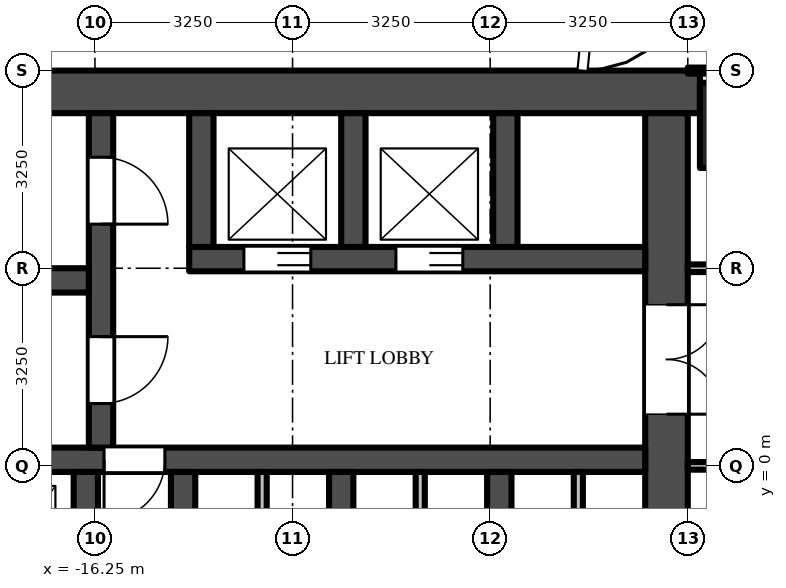
"""IFC4 building model, lengths in metres.
Left out: names, types, materials, properties, quantities, classifications, styles, units other than length and angle.
Written with IfcOpenShell. Run it as: python <this file> out.ifc"""

import sys

from ifc_helpers import new_model, si_unit, direction, frame, frame_2d, origin, origin_2d, place, context, subcontext, project, spatial, rectangle, extrude, source, transform, mapped, element, fill, save


model = new_model("IFC4")
c1 = context("Model", 3, precision=1e-05, world=origin(), true_north=direction((0.0, 1.0)))
c2 = subcontext(c1, "Body", "Model", "MODEL_VIEW")
j1 = project(units=[si_unit("LENGTHUNIT", "METRE"), si_unit("PLANEANGLEUNIT", "RADIAN")], contexts=[c1])
p1 = place(None, origin())
s1 = spatial("IfcSite", under=j1, at=p1, CompositionType="ELEMENT")
p2 = place(p1, origin())
s2 = spatial("IfcBuilding", under=s1, at=p2, CompositionType="ELEMENT")
p3 = place(p2, frame((0.0, 0.0, 74.5)))
s3 = spatial("IfcBuildingStorey", under=s2, at=p3, CompositionType="ELEMENT", Elevation=74.5)
m1 = source(origin(), c2, "Body", "SweptSolid", [
    extrude(rectangle(XDim=1.4, YDim=1.4, at=origin_2d()), origin(), (0.0, 0.0, 1.0), 4.5),
])
p4 = place(p3, frame((-5.6, 5.6, 0.0), z_axis=(0.0, 0.0, 1.0), x_axis=(1.0, 0.0, 0.0)))
e1 = element("IfcColumn", 1, at=p4, inside=s3, PredefinedType="COLUMN", context=c2, shape_type="MappedRepresentation", body=[
    mapped(m1, transform((0.0, 0.0, 0.0))),
])
m2 = source(origin(), c2, "Body", "SweptSolid", [
    extrude(rectangle(XDim=16.45, YDim=0.7, at=frame_2d((8.225, 0.0))), origin(), (0.0, 0.0, 1.0), 4.25),
])
p5 = place(p3, frame((-6.3, 6.15, 0.0), z_axis=(0.0, 0.0, 1.0), x_axis=(-1.0, 0.0, 0.0)))
e2 = element("IfcWall", 2, at=p5, inside=s3, PredefinedType="SHEAR", context=c2, shape_type="MappedRepresentation", body=[
    mapped(m2, transform((0.0, 0.0, 0.0))),
])
m3 = source(origin(), c2, "Body", "SweptSolid", [
    extrude(rectangle(XDim=9.05, YDim=0.7, at=frame_2d((4.525, 0.0))), origin(), (0.0, 0.0, 1.0), 4.25),
])
p6 = place(p3, frame((-6.85, 5.8, 0.0), z_axis=(0.0, 0.0, 1.0), x_axis=(0.0, -1.0, 0.0)))
e3 = element("IfcWall", 3, at=p6, inside=s3, PredefinedType="SHEAR", context=c2, shape_type="MappedRepresentation", body=[
    mapped(m3, transform((0.0, 0.0, 0.0))),
])
m4 = source(origin(), c2, "Body", "SweptSolid", [
    extrude(rectangle(XDim=1.8, YDim=2.1, at=frame_2d((0.9, 1.05))), frame((0.0, 0.36, 0.0), z_axis=(0.0, -1.0, 0.0), x_axis=(1.0, 0.0, 0.0)), (0.0, 0.0, 1.0), 0.72),
])
p7 = place(p6, frame((3.15, 0.0, 0.0)))
e4 = element("IfcOpeningElement", 4, at=p7, cuts=e3, PredefinedType="OPENING", context=c2, shape_type="MappedRepresentation", body=[
    mapped(m4, transform((0.0, 0.0, 0.0))),
])
m5 = source(origin(), c2, "Body", "SweptSolid", [
    extrude(rectangle(XDim=7.5, YDim=0.4, at=frame_2d((3.75, 0.0))), origin(), (0.0, 0.0, 1.0), 4.25),
])
p8 = place(p3, frame((-7.2, 3.4, 0.0), z_axis=(0.0, 0.0, 1.0), x_axis=(-1.0, 0.0, 0.0)))
e5 = element("IfcWall", 5, at=p8, inside=s3, PredefinedType="SHEAR", context=c2, shape_type="MappedRepresentation", body=[
    mapped(m5, transform((0.0, 0.0, 0.0))),
])
m6 = source(origin(), c2, "Body", "SweptSolid", [
    extrude(rectangle(XDim=1.1, YDim=2.1, at=frame_2d((0.55, 1.05))), frame((0.0, 0.21, 0.0), z_axis=(0.0, -1.0, 0.0), x_axis=(1.0, 0.0, 0.0)), (0.0, 0.0, 1.0), 0.42),
])
p9 = place(p8, frame((3.0, 0.0, 0.0)))
e6 = element("IfcOpeningElement", 6, at=p9, cuts=e5, PredefinedType="OPENING", context=c2, shape_type="MappedRepresentation", body=[
    mapped(m6, transform((0.0, 0.0, 0.0))),
])
p10 = place(p8, frame((5.5, 0.0, 0.0)))
e7 = element("IfcOpeningElement", 7, at=p10, cuts=e5, PredefinedType="OPENING", context=c2, shape_type="MappedRepresentation", body=[
    mapped(m6, transform((0.0, 0.0, 0.0))),
])
m7 = source(origin(), c2, "Body", "SweptSolid", [
    extrude(rectangle(XDim=14.85, YDim=0.4, at=frame_2d((7.425, 0.0))), origin(), (0.0, 0.0, 1.0), 4.25),
])
p11 = place(p3, frame((-7.2, 0.1, 0.0), z_axis=(0.0, 0.0, 1.0), x_axis=(-1.0, 0.0, 0.0)))
e8 = element("IfcWall", 8, at=p11, inside=s3, PredefinedType="SHEAR", context=c2, shape_type="MappedRepresentation", body=[
    mapped(m7, transform((0.0, 0.0, 0.0))),
])
m8 = source(origin(), c2, "Body", "SweptSolid", [
    extrude(rectangle(XDim=1.0, YDim=2.1, at=frame_2d((0.5, 1.05))), frame((0.0, 0.21, 0.0), z_axis=(0.0, -1.0, 0.0), x_axis=(1.0, 0.0, 0.0)), (0.0, 0.0, 1.0), 0.42),
])
p12 = place(p11, frame((7.9, 0.0, 0.0)))
e9 = element("IfcOpeningElement", 9, at=p12, cuts=e8, PredefinedType="OPENING", context=c2, shape_type="MappedRepresentation", body=[
    mapped(m8, transform((0.0, 0.0, 0.0))),
])
m9 = source(origin(), c2, "Body", "SweptSolid", [
    extrude(rectangle(XDim=5.5, YDim=0.4, at=frame_2d((2.75, 0.0))), origin(), (0.0, 0.0, 1.0), 4.25),
])
p13 = place(p3, frame((-16.15, 5.8, 0.0), z_axis=(0.0, 0.0, 1.0), x_axis=(0.0, -1.0, 0.0)))
e10 = element("IfcWall", 10, at=p13, inside=s3, PredefinedType="SHEAR", context=c2, shape_type="MappedRepresentation", body=[
    mapped(m9, transform((0.0, 0.0, 0.0))),
])
p14 = place(p13, frame((0.725, 0.0, 0.0)))
e11 = element("IfcOpeningElement", 11, at=p14, cuts=e10, PredefinedType="OPENING", context=c2, shape_type="MappedRepresentation", body=[
    mapped(m6, transform((0.0, 0.0, 0.0))),
])
p15 = place(p13, frame((3.675, 0.0, 0.0)))
e12 = element("IfcOpeningElement", 12, at=p15, cuts=e10, PredefinedType="OPENING", context=c2, shape_type="MappedRepresentation", body=[
    mapped(m6, transform((0.0, 0.0, 0.0))),
])
m10 = source(origin(), c2, "Body", "SweptSolid", [
    extrude(rectangle(XDim=5.7, YDim=0.4, at=frame_2d((2.85, 0.0))), origin(), (0.0, 0.0, 1.0), 4.25),
])
p16 = place(p3, frame((-16.35, 3.05, 0.0), z_axis=(0.0, 0.0, 1.0), x_axis=(-1.0, 0.0, 0.0)))
e13 = element("IfcWall", 13, at=p16, inside=s3, PredefinedType="SHEAR", context=c2, shape_type="MappedRepresentation", body=[
    mapped(m10, transform((0.0, 0.0, 0.0))),
])
m11 = source(origin(), c2, "Body", "SweptSolid", [
    extrude(rectangle(XDim=2.2, YDim=0.4, at=frame_2d((1.1, 0.0))), origin(), (0.0, 0.0, 1.0), 4.25),
])
for number, where, z_axis, x_axis in (
    (14, (-9.5, 5.8, 0.0), (0.0, 0.0, 1.0), (0.0, -1.0, 0.0)),
    (15, (-12.0, 5.8, 0.0), (0.0, 0.0, 1.0), (0.0, -1.0, 0.0)),
    (16, (-14.5, 5.8, 0.0), (0.0, 0.0, 1.0), (0.0, -1.0, 0.0)),
):
    element("IfcWall", number, at=place(p3, frame(where, z_axis=z_axis, x_axis=x_axis)), inside=s3, PredefinedType="SHEAR", context=c2, shape_type="MappedRepresentation", body=[
        mapped(m11, transform((0.0, 0.0, 0.0))),
    ])
m12 = source(origin(), c2, "Body", "SweptSolid", [
    extrude(rectangle(XDim=2.45, YDim=0.4, at=frame_2d((1.225, 0.0))), origin(), (0.0, 0.0, 1.0), 4.25),
])
for number, where, z_axis, x_axis in (
    (17, (-9.6, -0.1, 0.0), (0.0, 0.0, 1.0), (0.0, -1.0, 0.0)),
    (18, (-12.2, -0.1, 0.0), (0.0, 0.0, 1.0), (0.0, -1.0, 0.0)),
    (19, (-14.8, -0.1, 0.0), (0.0, 0.0, 1.0), (0.0, -1.0, 0.0)),
    (20, (-16.4, -0.1, 0.0), (0.0, 0.0, 1.0), (0.0, -1.0, 0.0)),
):
    element("IfcWall", number, at=place(p3, frame(where, z_axis=z_axis, x_axis=x_axis)), inside=s3, PredefinedType="SHEAR", context=c2, shape_type="MappedRepresentation", body=[
        mapped(m12, transform((0.0, 0.0, 0.0))),
    ])
m13 = source(origin(), c2, "Body", "SweptSolid", [
    extrude(rectangle(XDim=2.45, YDim=0.15, at=frame_2d((1.225, 0.0))), origin(), (0.0, 0.0, 1.0), 4.25),
])
for number, where, z_axis, x_axis in (
    (21, (-8.3, -0.1, 0.0), (0.0, 0.0, 1.0), (0.0, -1.0, 0.0)),
    (22, (-10.9, -0.1, 0.0), (0.0, 0.0, 1.0), (0.0, -1.0, 0.0)),
    (23, (-13.5, -0.1, 0.0), (0.0, 0.0, 1.0), (0.0, -1.0, 0.0)),
):
    element("IfcWall", number, at=place(p3, frame(where, z_axis=z_axis, x_axis=x_axis)), inside=s3, PredefinedType="PARTITIONING", context=c2, shape_type="MappedRepresentation", body=[
        mapped(m13, transform((0.0, 0.0, 0.0))),
    ])
m14 = source(origin(), c2, "Body", "SweptSolid", [
    extrude(rectangle(XDim=5.363, YDim=0.125, at=frame_2d((2.681, 0.0))), origin(), (0.0, 0.0, 1.0), 3.468),
])
p17 = place(p3, frame((-1.137, 0.0, 0.0), z_axis=(0.0, 0.0, 1.0), x_axis=(-1.0, 0.0, 0.0)))
e24 = element("IfcWall", 24, at=p17, inside=s3, PredefinedType="PARTITIONING", context=c2, shape_type="MappedRepresentation", body=[
    mapped(m14, transform((0.0, 0.0, 0.0))),
])
p18 = place(p3, frame((-6.5, 3.25, 0.0), z_axis=(0.0, 0.0, 1.0), x_axis=(1.0, 0.0, 0.0)))
e25 = element("IfcWall", 25, at=p18, inside=s3, PredefinedType="PARTITIONING", context=c2, shape_type="MappedRepresentation", body=[
    mapped(m14, transform((0.0, 0.0, 0.0))),
])
m15 = source(origin(), c2, "Body", "SweptSolid", [
    extrude(rectangle(XDim=1.0, YDim=2.1, at=frame_2d((0.5, 1.05))), frame((0.0, 0.073, 0.0), z_axis=(0.0, -1.0, 0.0), x_axis=(1.0, 0.0, 0.0)), (0.0, 0.0, 1.0), 0.145),
])
p19 = place(p18, frame((1.3, 0.0, 0.0)))
e26 = element("IfcOpeningElement", 26, at=p19, cuts=e25, PredefinedType="OPENING", context=c2, shape_type="MappedRepresentation", body=[
    mapped(m15, transform((0.0, 0.0, 0.0))),
])
m16 = source(origin(), c2, "Body", "SweptSolid", [
    extrude(rectangle(XDim=5.238, YDim=0.1, at=frame_2d((2.619, 0.0))), origin(), (0.0, 0.0, 1.0), 3.33),
])
p20 = place(p3, frame((-6.5, 6.5, 0.0), z_axis=(0.0, 0.0, 1.0), x_axis=(1.0, 0.0, 0.0)))
e27 = element("IfcWall", 27, at=p20, inside=s3, PredefinedType="PARTITIONING", context=c2, shape_type="MappedRepresentation", body=[
    mapped(m16, transform((0.0, 0.0, 0.0))),
])
m17 = source(origin(), c2, "Body", "SweptSolid", [
    extrude(rectangle(XDim=1.1, YDim=2.1, at=frame_2d((0.55, 1.05))), frame((0.0, 0.025, 0.0), z_axis=(0.0, -1.0, 0.0), x_axis=(1.0, 0.0, 0.0)), (0.0, 0.0, 1.0), 0.05),
])
p21 = place(p9, origin())
e28 = element("IfcDoor", 28, at=p21, inside=s3, OperationType="DOUBLE_DOOR_SLIDING", PredefinedType="DOOR", context=c2, shape_type="MappedRepresentation", body=[
    mapped(m17, transform((0.0, 0.0, 0.0))),
])
fill(e6, e28)
p22 = place(p10, origin())
e29 = element("IfcDoor", 29, at=p22, inside=s3, OperationType="DOUBLE_DOOR_SLIDING", PredefinedType="DOOR", context=c2, shape_type="MappedRepresentation", body=[
    mapped(m17, transform((0.0, 0.0, 0.0))),
])
fill(e7, e29)
m18 = source(origin(), c2, "Body", "SweptSolid", [
    extrude(rectangle(XDim=1.8, YDim=2.1, at=frame_2d((0.9, 1.05))), frame((0.0, -0.275, 0.0), z_axis=(0.0, -1.0, 0.0), x_axis=(1.0, 0.0, 0.0)), (0.0, 0.0, 1.0), 0.05),
])
p23 = place(p7, origin())
e30 = element("IfcDoor", 30, at=p23, inside=s3, OperationType="DOUBLE_DOOR_SINGLE_SWING", PredefinedType="DOOR", context=c2, shape_type="MappedRepresentation", body=[
    mapped(m18, transform((0.0, 0.0, 0.0))),
])
fill(e4, e30)
p24 = place(p14, origin())
e31 = element("IfcDoor", 31, at=p24, inside=s3, OperationType="SINGLE_SWING_RIGHT", PredefinedType="DOOR", context=c2, shape_type="MappedRepresentation", body=[
    mapped(m17, transform((0.0, 0.0, 0.0))),
])
fill(e11, e31)
p25 = place(p15, origin())
e32 = element("IfcDoor", 32, at=p25, inside=s3, OperationType="SINGLE_SWING_LEFT", PredefinedType="DOOR", context=c2, shape_type="MappedRepresentation", body=[
    mapped(m17, transform((0.0, 0.0, 0.0))),
])
fill(e12, e32)
m19 = source(origin(), c2, "Body", "SweptSolid", [
    extrude(rectangle(XDim=1.0, YDim=2.1, at=frame_2d((0.5, 1.05))), frame((0.0, 0.025, 0.0), z_axis=(0.0, -1.0, 0.0), x_axis=(1.0, 0.0, 0.0)), (0.0, 0.0, 1.0), 0.05),
])
p26 = place(p12, origin())
e33 = element("IfcDoor", 33, at=p26, inside=s3, OperationType="SINGLE_SWING_RIGHT", PredefinedType="DOOR", context=c2, shape_type="MappedRepresentation", body=[
    mapped(m19, transform((0.0, 0.0, 0.0))),
])
fill(e9, e33)
save(model, sys.argv[1])
